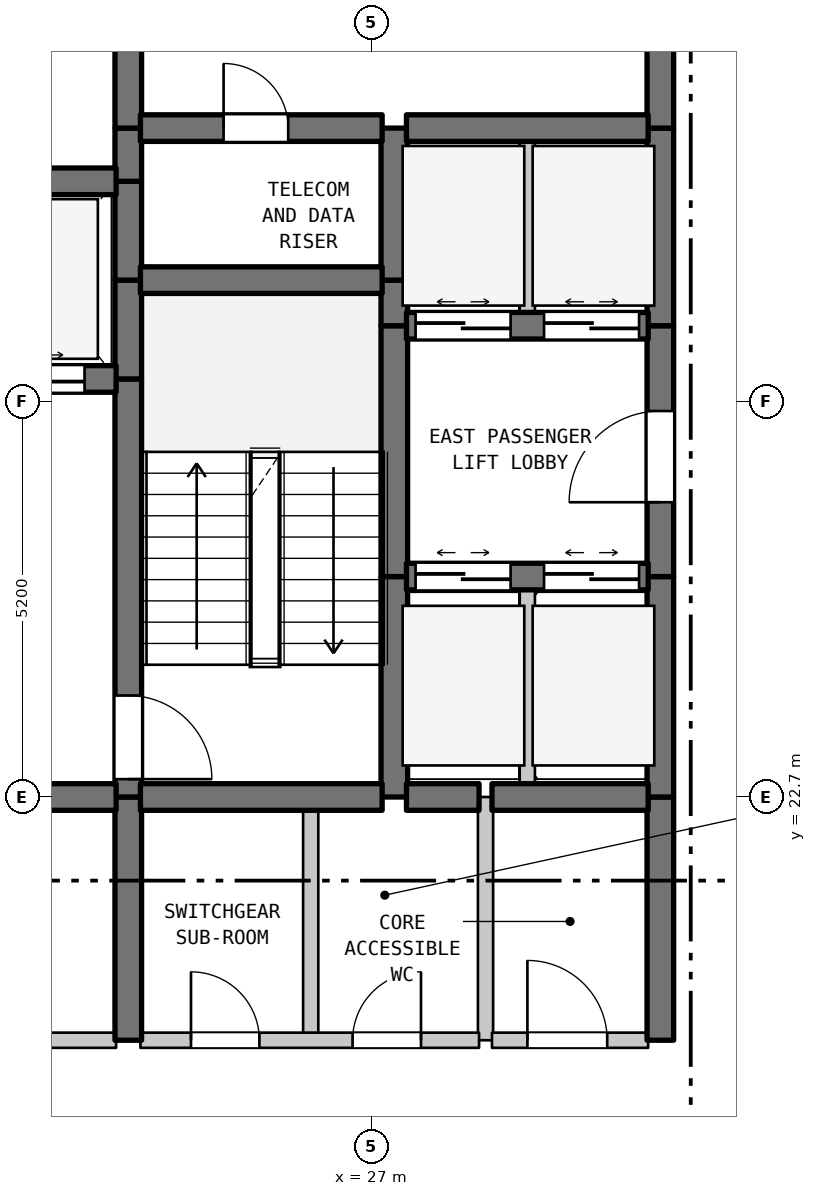
"""IFC4 building model, lengths in metres.
Left out: names, types, materials, properties, quantities, classifications, styles, units other than length and angle.
Written with IfcOpenShell. Run it as: python <this file> out.ifc"""

import sys

from ifc_helpers import new_model, si_unit, direction, frame, frame_2d, origin, place, context, subcontext, project, spatial, rectangle, extrude, element, fill, save


model = new_model("IFC4")
c1 = context("Model", 3, precision=1e-05, world=origin(), true_north=direction((0.0, 1.0)))
c2 = subcontext(c1, "Body", "Model", "MODEL_VIEW")
j1 = project(units=[si_unit("LENGTHUNIT", "METRE"), si_unit("PLANEANGLEUNIT", "RADIAN")], contexts=[c1])
p1 = place(None, origin())
s1 = spatial("IfcSite", under=j1, at=p1, CompositionType="ELEMENT")
p2 = place(p1, origin())
s2 = spatial("IfcBuilding", under=s1, at=p2, CompositionType="ELEMENT")
p3 = place(p2, frame((0.0, 0.0, 192.1)))
s3 = spatial("IfcBuildingStorey", under=s2, at=p3, CompositionType="ELEMENT", Elevation=192.1)
p4 = place(p3, frame((23.8, 19.5, 0.0), z_axis=(0.0, 0.0, 1.0), x_axis=(0.0, 1.0, 0.0)))
e1 = element("IfcWall", 1, at=p4, inside=s3, PredefinedType="SHEAR", context=c2, shape_type="SweptSolid", body=[
    extrude(rectangle(XDim=3.2, YDim=0.35, at=frame_2d((1.6, 0.0))), origin(), (0.0, 0.0, 1.0), 3.39),
])
p5 = place(p3, frame((23.8, 22.7, 0.0), z_axis=(0.0, 0.0, 1.0), x_axis=(0.0, 1.0, 0.0)))
e2 = element("IfcWall", 2, at=p5, inside=s3, PredefinedType="SHEAR", context=c2, shape_type="SweptSolid", body=[
    extrude(rectangle(XDim=5.5, YDim=0.35, at=frame_2d((2.75, 0.0))), origin(), (0.0, 0.0, 1.0), 3.39),
])
p6 = place(p5, frame((0.235, 0.0, 0.0)))
e3 = element("IfcOpeningElement", 3, at=p6, cuts=e2, PredefinedType="OPENING", context=c2, shape_type="SweptSolid", body=[
    extrude(rectangle(XDim=1.1, YDim=2.15, at=frame_2d((0.55, 1.075))), frame((0.0, 0.185, 0.0), z_axis=(0.0, -1.0, 0.0), x_axis=(1.0, 0.0, 0.0)), (0.0, 0.0, 1.0), 0.37),
])
for number, where, z_axis, x_axis in (
    (4, (23.8, 28.2, 0.0), (0.0, 0.0, 1.0), (0.0, 1.0, 0.0)),
    (5, (23.8, 29.5, 0.0), (0.0, 0.0, 1.0), (0.0, 1.0, 0.0)),
):
    element("IfcWall", number, at=place(p3, frame(where, z_axis=z_axis, x_axis=x_axis)), inside=s3, PredefinedType="SHEAR", context=c2, shape_type="SweptSolid", body=[
        extrude(rectangle(XDim=1.3, YDim=0.35, at=frame_2d((0.65, 0.0))), origin(), (0.0, 0.0, 1.0), 3.39),
    ])
p7 = place(p3, frame((23.8, 30.8, 0.0), z_axis=(0.0, 0.0, 1.0), x_axis=(0.0, 1.0, 0.0)))
e6 = element("IfcWall", 6, at=p7, inside=s3, PredefinedType="SHEAR", context=c2, shape_type="SweptSolid", body=[
    extrude(rectangle(XDim=0.7, YDim=0.35, at=frame_2d((0.35, 0.0))), origin(), (0.0, 0.0, 1.0), 3.39),
])
p8 = place(p3, frame((23.8, 31.5, 0.0), z_axis=(0.0, 0.0, 1.0), x_axis=(0.0, 1.0, 0.0)))
e7 = element("IfcWall", 7, at=p8, inside=s3, PredefinedType="SHEAR", context=c2, shape_type="SweptSolid", body=[
    extrude(rectangle(XDim=3.5, YDim=0.35, at=frame_2d((1.75, 0.0))), origin(), (0.0, 0.0, 1.0), 3.39),
])
p9 = place(p8, frame((1.127, 0.0, 0.0)))
e8 = element("IfcOpeningElement", 8, at=p9, cuts=e7, PredefinedType="OPENING", context=c2, shape_type="SweptSolid", body=[
    extrude(rectangle(XDim=1.1, YDim=2.15, at=frame_2d((0.55, 1.075))), frame((0.0, 0.185, 0.0), z_axis=(0.0, -1.0, 0.0), x_axis=(1.0, 0.0, 0.0)), (0.0, 0.0, 1.0), 0.37),
])
p10 = place(p3, frame((26.2, 19.5, 0.0), z_axis=(0.0, 0.0, 1.0), x_axis=(0.0, 1.0, 0.0)))
e9 = element("IfcWall", 9, at=p10, inside=s3, PredefinedType="STANDARD", context=c2, shape_type="SweptSolid", body=[
    extrude(rectangle(XDim=3.2, YDim=0.2, at=frame_2d((1.6, 0.0))), origin(), (0.0, 0.0, 1.0), 3.39),
])
p11 = place(p3, frame((27.3, 22.7, 0.0), z_axis=(0.0, 0.0, 1.0), x_axis=(0.0, 1.0, 0.0)))
e10 = element("IfcWall", 10, at=p11, inside=s3, PredefinedType="SHEAR", context=c2, shape_type="SweptSolid", body=[
    extrude(rectangle(XDim=2.9, YDim=0.35, at=frame_2d((1.45, 0.0))), origin(), (0.0, 0.0, 1.0), 3.39),
])
p12 = place(p3, frame((27.3, 25.6, 0.0), z_axis=(0.0, 0.0, 1.0), x_axis=(0.0, 1.0, 0.0)))
e11 = element("IfcWall", 11, at=p12, inside=s3, PredefinedType="SHEAR", context=c2, shape_type="SweptSolid", body=[
    extrude(rectangle(XDim=3.3, YDim=0.35, at=frame_2d((1.65, 0.0))), origin(), (0.0, 0.0, 1.0), 3.39),
])
p13 = place(p3, frame((27.3, 28.9, 0.0), z_axis=(0.0, 0.0, 1.0), x_axis=(0.0, 1.0, 0.0)))
e12 = element("IfcWall", 12, at=p13, inside=s3, PredefinedType="SHEAR", context=c2, shape_type="SweptSolid", body=[
    extrude(rectangle(XDim=0.6, YDim=0.35, at=frame_2d((0.3, 0.0))), origin(), (0.0, 0.0, 1.0), 3.39),
])
p14 = place(p3, frame((27.3, 29.5, 0.0), z_axis=(0.0, 0.0, 1.0), x_axis=(0.0, 1.0, 0.0)))
e13 = element("IfcWall", 13, at=p14, inside=s3, PredefinedType="SHEAR", context=c2, shape_type="SweptSolid", body=[
    extrude(rectangle(XDim=2.0, YDim=0.35, at=frame_2d((1.0, 0.0))), origin(), (0.0, 0.0, 1.0), 3.39),
])
p15 = place(p3, frame((28.5, 19.5, 0.0), z_axis=(0.0, 0.0, 1.0), x_axis=(0.0, 1.0, 0.0)))
e14 = element("IfcWall", 14, at=p15, inside=s3, PredefinedType="STANDARD", context=c2, shape_type="SweptSolid", body=[
    extrude(rectangle(XDim=3.2, YDim=0.2, at=frame_2d((1.6, 0.0))), origin(), (0.0, 0.0, 1.0), 3.39),
])
p16 = place(p3, frame((29.05, 22.7, 0.0), z_axis=(0.0, 0.0, 1.0), x_axis=(0.0, 1.0, 0.0)))
e15 = element("IfcWall", 15, at=p16, inside=s3, PredefinedType="STANDARD", context=c2, shape_type="SweptSolid", body=[
    extrude(rectangle(XDim=2.9, YDim=0.2, at=frame_2d((1.45, 0.0))), origin(), (0.0, 0.0, 1.0), 3.39),
])
p17 = place(p3, frame((29.05, 28.9, 0.0), z_axis=(0.0, 0.0, 1.0), x_axis=(0.0, 1.0, 0.0)))
e16 = element("IfcWall", 16, at=p17, inside=s3, PredefinedType="STANDARD", context=c2, shape_type="SweptSolid", body=[
    extrude(rectangle(XDim=2.6, YDim=0.2, at=frame_2d((1.3, 0.0))), origin(), (0.0, 0.0, 1.0), 3.39),
])
p18 = place(p3, frame((30.8, 19.5, 0.0), z_axis=(0.0, 0.0, 1.0), x_axis=(0.0, 1.0, 0.0)))
e17 = element("IfcWall", 17, at=p18, inside=s3, PredefinedType="SHEAR", context=c2, shape_type="SweptSolid", body=[
    extrude(rectangle(XDim=3.2, YDim=0.35, at=frame_2d((1.6, 0.0))), origin(), (0.0, 0.0, 1.0), 3.39),
])
p19 = place(p3, frame((30.8, 22.7, 0.0), z_axis=(0.0, 0.0, 1.0), x_axis=(0.0, 1.0, 0.0)))
e18 = element("IfcWall", 18, at=p19, inside=s3, PredefinedType="SHEAR", context=c2, shape_type="SweptSolid", body=[
    extrude(rectangle(XDim=2.9, YDim=0.35, at=frame_2d((1.45, 0.0))), origin(), (0.0, 0.0, 1.0), 3.39),
])
p20 = place(p3, frame((30.8, 25.6, 0.0), z_axis=(0.0, 0.0, 1.0), x_axis=(0.0, 1.0, 0.0)))
e19 = element("IfcWall", 19, at=p20, inside=s3, PredefinedType="SHEAR", context=c2, shape_type="SweptSolid", body=[
    extrude(rectangle(XDim=3.3, YDim=0.35, at=frame_2d((1.65, 0.0))), origin(), (0.0, 0.0, 1.0), 3.39),
])
p21 = place(p20, frame((0.978, 0.0, 0.0)))
e20 = element("IfcOpeningElement", 20, at=p21, cuts=e19, PredefinedType="OPENING", context=c2, shape_type="SweptSolid", body=[
    extrude(rectangle(XDim=1.2, YDim=2.2, at=frame_2d((0.6, 1.1))), frame((0.0, 0.185, 0.0), z_axis=(0.0, -1.0, 0.0), x_axis=(1.0, 0.0, 0.0)), (0.0, 0.0, 1.0), 0.37),
])
p22 = place(p3, frame((30.8, 28.9, 0.0), z_axis=(0.0, 0.0, 1.0), x_axis=(0.0, 1.0, 0.0)))
e21 = element("IfcWall", 21, at=p22, inside=s3, PredefinedType="SHEAR", context=c2, shape_type="SweptSolid", body=[
    extrude(rectangle(XDim=2.6, YDim=0.35, at=frame_2d((1.3, 0.0))), origin(), (0.0, 0.0, 1.0), 3.39),
])
p23 = place(p3, frame((30.8, 31.5, 0.0), z_axis=(0.0, 0.0, 1.0), x_axis=(0.0, 1.0, 0.0)))
e22 = element("IfcWall", 22, at=p23, inside=s3, PredefinedType="SHEAR", context=c2, shape_type="SweptSolid", body=[
    extrude(rectangle(XDim=3.5, YDim=0.35, at=frame_2d((1.75, 0.0))), origin(), (0.0, 0.0, 1.0), 3.39),
])
p24 = place(p23, frame((1.15, 0.0, 0.0)))
e23 = element("IfcOpeningElement", 23, at=p24, cuts=e22, PredefinedType="OPENING", context=c2, shape_type="SweptSolid", body=[
    extrude(rectangle(XDim=1.2, YDim=2.2, at=frame_2d((0.6, 1.1))), frame((0.0, 0.185, 0.0), z_axis=(0.0, -1.0, 0.0), x_axis=(1.0, 0.0, 0.0)), (0.0, 0.0, 1.0), 0.37),
])
p25 = place(p3, frame((19.16, 19.5, 0.0), z_axis=(0.0, 0.0, 1.0), x_axis=(1.0, 0.0, 0.0)))
e24 = element("IfcWall", 24, at=p25, inside=s3, PredefinedType="STANDARD", context=c2, shape_type="SweptSolid", body=[
    extrude(rectangle(XDim=4.48, YDim=0.2, at=frame_2d((2.24, 0.0))), origin(), (0.0, 0.0, 1.0), 3.39),
])
p26 = place(p25, frame((1.64, 0.0, 0.0)))
e25 = element("IfcOpeningElement", 25, at=p26, cuts=e24, PredefinedType="OPENING", context=c2, shape_type="SweptSolid", body=[
    extrude(rectangle(XDim=1.2, YDim=2.2, at=frame_2d((0.6, 1.1))), frame((0.0, 0.11, 0.0), z_axis=(0.0, -1.0, 0.0), x_axis=(1.0, 0.0, 0.0)), (0.0, 0.0, 1.0), 0.22),
])
p27 = place(p3, frame((23.96, 19.5, 0.0), z_axis=(0.0, 0.0, 1.0), x_axis=(1.0, 0.0, 0.0)))
e26 = element("IfcWall", 26, at=p27, inside=s3, PredefinedType="STANDARD", context=c2, shape_type="SweptSolid", body=[
    extrude(rectangle(XDim=4.455, YDim=0.2, at=frame_2d((2.228, 0.0))), origin(), (0.0, 0.0, 1.0), 3.39),
])
p28 = place(p27, frame((0.665, 0.0, 0.0)))
e27 = element("IfcOpeningElement", 27, at=p28, cuts=e26, PredefinedType="OPENING", context=c2, shape_type="SweptSolid", body=[
    extrude(rectangle(XDim=0.9, YDim=2.15, at=frame_2d((0.45, 1.075))), frame((0.0, 0.11, 0.0), z_axis=(0.0, -1.0, 0.0), x_axis=(1.0, 0.0, 0.0)), (0.0, 0.0, 1.0), 0.22),
])
p29 = place(p27, frame((2.791, 0.0, 0.0)))
e28 = element("IfcOpeningElement", 28, at=p29, cuts=e26, PredefinedType="OPENING", context=c2, shape_type="SweptSolid", body=[
    extrude(rectangle(XDim=0.9, YDim=2.15, at=frame_2d((0.45, 1.075))), frame((0.0, 0.11, 0.0), z_axis=(0.0, -1.0, 0.0), x_axis=(1.0, 0.0, 0.0)), (0.0, 0.0, 1.0), 0.22),
])
p30 = place(p3, frame((28.585, 19.5, 0.0), z_axis=(0.0, 0.0, 1.0), x_axis=(1.0, 0.0, 0.0)))
e29 = element("IfcWall", 29, at=p30, inside=s3, PredefinedType="STANDARD", context=c2, shape_type="SweptSolid", body=[
    extrude(rectangle(XDim=2.055, YDim=0.2, at=frame_2d((1.027, 0.0))), origin(), (0.0, 0.0, 1.0), 3.39),
])
p31 = place(p30, frame((0.466, 0.0, 0.0)))
e30 = element("IfcOpeningElement", 30, at=p31, cuts=e29, PredefinedType="OPENING", context=c2, shape_type="SweptSolid", body=[
    extrude(rectangle(XDim=1.05, YDim=2.15, at=frame_2d((0.525, 1.075))), frame((0.0, 0.11, 0.0), z_axis=(0.0, -1.0, 0.0), x_axis=(1.0, 0.0, 0.0)), (0.0, 0.0, 1.0), 0.22),
])
p32 = place(p3, frame((19.16, 22.7, 0.0), z_axis=(0.0, 0.0, 1.0), x_axis=(1.0, 0.0, 0.0)))
e31 = element("IfcWall", 31, at=p32, inside=s3, PredefinedType="SHEAR", context=c2, shape_type="SweptSolid", body=[
    extrude(rectangle(XDim=4.48, YDim=0.35, at=frame_2d((2.24, 0.0))), origin(), (0.0, 0.0, 1.0), 3.39),
])
p33 = place(p32, frame((1.64, 0.0, 0.0)))
e32 = element("IfcOpeningElement", 32, at=p33, cuts=e31, PredefinedType="OPENING", context=c2, shape_type="SweptSolid", body=[
    extrude(rectangle(XDim=1.2, YDim=2.2, at=frame_2d((0.6, 1.1))), frame((0.0, 0.185, 0.0), z_axis=(0.0, -1.0, 0.0), x_axis=(1.0, 0.0, 0.0)), (0.0, 0.0, 1.0), 0.37),
])
p34 = place(p3, frame((23.96, 22.7, 0.0), z_axis=(0.0, 0.0, 1.0), x_axis=(1.0, 0.0, 0.0)))
e33 = element("IfcWall", 33, at=p34, inside=s3, PredefinedType="SHEAR", context=c2, shape_type="SweptSolid", body=[
    extrude(rectangle(XDim=3.18, YDim=0.35, at=frame_2d((1.59, 0.0))), origin(), (0.0, 0.0, 1.0), 3.39),
])
p35 = place(p3, frame((27.46, 22.7, 0.0), z_axis=(0.0, 0.0, 1.0), x_axis=(1.0, 0.0, 0.0)))
e34 = element("IfcWall", 34, at=p35, inside=s3, PredefinedType="SHEAR", context=c2, shape_type="SweptSolid", body=[
    extrude(rectangle(XDim=0.955, YDim=0.35, at=frame_2d((0.478, 0.0))), origin(), (0.0, 0.0, 1.0), 3.39),
])
p36 = place(p3, frame((28.585, 22.7, 0.0), z_axis=(0.0, 0.0, 1.0), x_axis=(1.0, 0.0, 0.0)))
e35 = element("IfcWall", 35, at=p36, inside=s3, PredefinedType="SHEAR", context=c2, shape_type="SweptSolid", body=[
    extrude(rectangle(XDim=2.055, YDim=0.35, at=frame_2d((1.027, 0.0))), origin(), (0.0, 0.0, 1.0), 3.39),
])
p37 = place(p3, frame((27.46, 25.6, 0.0), z_axis=(0.0, 0.0, 1.0), x_axis=(1.0, 0.0, 0.0)))
e36 = element("IfcWall", 36, at=p37, inside=s3, PredefinedType="SHEAR", context=c2, shape_type="SweptSolid", body=[
    extrude(rectangle(XDim=3.18, YDim=0.35, at=frame_2d((1.59, 0.0))), origin(), (0.0, 0.0, 1.0), 3.39),
])
p38 = place(p37, frame((0.12, 0.0, 0.0)))
e37 = element("IfcOpeningElement", 37, at=p38, cuts=e36, PredefinedType="OPENING", context=c2, shape_type="SweptSolid", body=[
    extrude(rectangle(XDim=1.25, YDim=2.2, at=frame_2d((0.625, 1.1))), frame((0.0, 0.185, 0.0), z_axis=(0.0, -1.0, 0.0), x_axis=(1.0, 0.0, 0.0)), (0.0, 0.0, 1.0), 0.37),
])
p39 = place(p37, frame((1.81, 0.0, 0.0)))
e38 = element("IfcOpeningElement", 38, at=p39, cuts=e36, PredefinedType="OPENING", context=c2, shape_type="SweptSolid", body=[
    extrude(rectangle(XDim=1.25, YDim=2.2, at=frame_2d((0.625, 1.1))), frame((0.0, 0.185, 0.0), z_axis=(0.0, -1.0, 0.0), x_axis=(1.0, 0.0, 0.0)), (0.0, 0.0, 1.0), 0.37),
])
p40 = place(p3, frame((19.16, 28.2, 0.0), z_axis=(0.0, 0.0, 1.0), x_axis=(1.0, 0.0, 0.0)))
e39 = element("IfcWall", 39, at=p40, inside=s3, PredefinedType="SHEAR", context=c2, shape_type="SweptSolid", body=[
    extrude(rectangle(XDim=4.48, YDim=0.35, at=frame_2d((2.24, 0.0))), origin(), (0.0, 0.0, 1.0), 3.39),
])
p41 = place(p40, frame((0.415, 0.0, 0.0)))
e40 = element("IfcOpeningElement", 40, at=p41, cuts=e39, PredefinedType="OPENING", context=c2, shape_type="SweptSolid", body=[
    extrude(rectangle(XDim=1.25, YDim=2.2, at=frame_2d((0.625, 1.1))), frame((0.0, 0.185, 0.0), z_axis=(0.0, -1.0, 0.0), x_axis=(1.0, 0.0, 0.0)), (0.0, 0.0, 1.0), 0.37),
])
p42 = place(p40, frame((2.815, 0.0, 0.0)))
e41 = element("IfcOpeningElement", 41, at=p42, cuts=e39, PredefinedType="OPENING", context=c2, shape_type="SweptSolid", body=[
    extrude(rectangle(XDim=1.25, YDim=2.2, at=frame_2d((0.625, 1.1))), frame((0.0, 0.185, 0.0), z_axis=(0.0, -1.0, 0.0), x_axis=(1.0, 0.0, 0.0)), (0.0, 0.0, 1.0), 0.37),
])
p43 = place(p3, frame((27.46, 28.9, 0.0), z_axis=(0.0, 0.0, 1.0), x_axis=(1.0, 0.0, 0.0)))
e42 = element("IfcWall", 42, at=p43, inside=s3, PredefinedType="SHEAR", context=c2, shape_type="SweptSolid", body=[
    extrude(rectangle(XDim=3.18, YDim=0.35, at=frame_2d((1.59, 0.0))), origin(), (0.0, 0.0, 1.0), 3.39),
])
p44 = place(p43, frame((0.12, 0.0, 0.0)))
e43 = element("IfcOpeningElement", 43, at=p44, cuts=e42, PredefinedType="OPENING", context=c2, shape_type="SweptSolid", body=[
    extrude(rectangle(XDim=1.25, YDim=2.2, at=frame_2d((0.625, 1.1))), frame((0.0, 0.185, 0.0), z_axis=(0.0, -1.0, 0.0), x_axis=(1.0, 0.0, 0.0)), (0.0, 0.0, 1.0), 0.37),
])
p45 = place(p43, frame((1.81, 0.0, 0.0)))
e44 = element("IfcOpeningElement", 44, at=p45, cuts=e42, PredefinedType="OPENING", context=c2, shape_type="SweptSolid", body=[
    extrude(rectangle(XDim=1.25, YDim=2.2, at=frame_2d((0.625, 1.1))), frame((0.0, 0.185, 0.0), z_axis=(0.0, -1.0, 0.0), x_axis=(1.0, 0.0, 0.0)), (0.0, 0.0, 1.0), 0.37),
])
p46 = place(p3, frame((23.96, 29.5, 0.0), z_axis=(0.0, 0.0, 1.0), x_axis=(1.0, 0.0, 0.0)))
e45 = element("IfcWall", 45, at=p46, inside=s3, PredefinedType="SHEAR", context=c2, shape_type="SweptSolid", body=[
    extrude(rectangle(XDim=3.18, YDim=0.35, at=frame_2d((1.59, 0.0))), origin(), (0.0, 0.0, 1.0), 3.39),
])
p47 = place(p3, frame((19.16, 30.8, 0.0), z_axis=(0.0, 0.0, 1.0), x_axis=(1.0, 0.0, 0.0)))
e46 = element("IfcWall", 46, at=p47, inside=s3, PredefinedType="SHEAR", context=c2, shape_type="SweptSolid", body=[
    extrude(rectangle(XDim=4.48, YDim=0.35, at=frame_2d((2.24, 0.0))), origin(), (0.0, 0.0, 1.0), 3.39),
])
p48 = place(p3, frame((23.96, 31.5, 0.0), z_axis=(0.0, 0.0, 1.0), x_axis=(1.0, 0.0, 0.0)))
e47 = element("IfcWall", 47, at=p48, inside=s3, PredefinedType="SHEAR", context=c2, shape_type="SweptSolid", body=[
    extrude(rectangle(XDim=3.18, YDim=0.35, at=frame_2d((1.59, 0.0))), origin(), (0.0, 0.0, 1.0), 3.39),
])
p49 = place(p48, frame((1.094, 0.0, 0.0)))
e48 = element("IfcOpeningElement", 48, at=p49, cuts=e47, PredefinedType="OPENING", context=c2, shape_type="SweptSolid", body=[
    extrude(rectangle(XDim=0.85, YDim=2.1, at=frame_2d((0.425, 1.05))), frame((0.0, 0.185, 0.0), z_axis=(0.0, -1.0, 0.0), x_axis=(1.0, 0.0, 0.0)), (0.0, 0.0, 1.0), 0.37),
])
p50 = place(p3, frame((27.46, 31.5, 0.0), z_axis=(0.0, 0.0, 1.0), x_axis=(1.0, 0.0, 0.0)))
e49 = element("IfcWall", 49, at=p50, inside=s3, PredefinedType="SHEAR", context=c2, shape_type="SweptSolid", body=[
    extrude(rectangle(XDim=3.18, YDim=0.35, at=frame_2d((1.59, 0.0))), origin(), (0.0, 0.0, 1.0), 3.39),
])
p51 = place(p6, frame((1.1, 0.0, 0.0), z_axis=(0.0, 0.0, 1.0), x_axis=(-1.0, 0.0, 0.0)))
e50 = element("IfcDoor", 50, at=p51, inside=s3, OperationType="SINGLE_SWING_LEFT", PredefinedType="DOOR", context=c2, shape_type="SweptSolid", body=[
    extrude(rectangle(XDim=1.1, YDim=2.15, at=frame_2d((0.55, 1.075))), frame((0.0, 0.025, 0.0), z_axis=(0.0, -1.0, 0.0), x_axis=(1.0, 0.0, 0.0)), (0.0, 0.0, 1.0), 0.05),
])
fill(e3, e50)
p52 = place(p21, origin())
e51 = element("IfcDoor", 51, at=p52, inside=s3, OperationType="SINGLE_SWING_LEFT", PredefinedType="DOOR", context=c2, shape_type="SweptSolid", body=[
    extrude(rectangle(XDim=1.2, YDim=2.2, at=frame_2d((0.6, 1.1))), frame((0.0, 0.025, 0.0), z_axis=(0.0, -1.0, 0.0), x_axis=(1.0, 0.0, 0.0)), (0.0, 0.0, 1.0), 0.05),
])
fill(e20, e51)
p53 = place(p28, origin())
e52 = element("IfcDoor", 52, at=p53, inside=s3, OperationType="SINGLE_SWING_LEFT", PredefinedType="DOOR", context=c2, shape_type="SweptSolid", body=[
    extrude(rectangle(XDim=0.9, YDim=2.15, at=frame_2d((0.45, 1.075))), frame((0.0, 0.025, 0.0), z_axis=(0.0, -1.0, 0.0), x_axis=(1.0, 0.0, 0.0)), (0.0, 0.0, 1.0), 0.05),
])
fill(e27, e52)
p54 = place(p29, origin())
e53 = element("IfcDoor", 53, at=p54, inside=s3, OperationType="SINGLE_SWING_RIGHT", PredefinedType="DOOR", context=c2, shape_type="SweptSolid", body=[
    extrude(rectangle(XDim=0.9, YDim=2.15, at=frame_2d((0.45, 1.075))), frame((0.0, 0.025, 0.0), z_axis=(0.0, -1.0, 0.0), x_axis=(1.0, 0.0, 0.0)), (0.0, 0.0, 1.0), 0.05),
])
fill(e28, e53)
p55 = place(p31, origin())
e54 = element("IfcDoor", 54, at=p55, inside=s3, OperationType="SINGLE_SWING_LEFT", PredefinedType="DOOR", context=c2, shape_type="SweptSolid", body=[
    extrude(rectangle(XDim=1.05, YDim=2.15, at=frame_2d((0.525, 1.075))), frame((0.0, 0.025, 0.0), z_axis=(0.0, -1.0, 0.0), x_axis=(1.0, 0.0, 0.0)), (0.0, 0.0, 1.0), 0.05),
])
fill(e30, e54)
p56 = place(p38, origin())
e55 = element("IfcDoor", 55, at=p56, inside=s3, OperationType="DOUBLE_DOOR_SLIDING", PredefinedType="DOOR", context=c2, shape_type="SweptSolid", body=[
    extrude(rectangle(XDim=1.25, YDim=2.2, at=frame_2d((0.625, 1.1))), frame((0.0, 0.025, 0.0), z_axis=(0.0, -1.0, 0.0), x_axis=(1.0, 0.0, 0.0)), (0.0, 0.0, 1.0), 0.05),
])
fill(e37, e55)
p57 = place(p39, origin())
e56 = element("IfcDoor", 56, at=p57, inside=s3, OperationType="DOUBLE_DOOR_SLIDING", PredefinedType="DOOR", context=c2, shape_type="SweptSolid", body=[
    extrude(rectangle(XDim=1.25, YDim=2.2, at=frame_2d((0.625, 1.1))), frame((0.0, 0.025, 0.0), z_axis=(0.0, -1.0, 0.0), x_axis=(1.0, 0.0, 0.0)), (0.0, 0.0, 1.0), 0.05),
])
fill(e38, e56)
p58 = place(p42, origin())
e57 = element("IfcDoor", 57, at=p58, inside=s3, OperationType="DOUBLE_DOOR_SLIDING", PredefinedType="DOOR", context=c2, shape_type="SweptSolid", body=[
    extrude(rectangle(XDim=1.25, YDim=2.2, at=frame_2d((0.625, 1.1))), frame((0.0, 0.025, 0.0), z_axis=(0.0, -1.0, 0.0), x_axis=(1.0, 0.0, 0.0)), (0.0, 0.0, 1.0), 0.05),
])
fill(e41, e57)
p59 = place(p44, origin())
e58 = element("IfcDoor", 58, at=p59, inside=s3, OperationType="DOUBLE_DOOR_SLIDING", PredefinedType="DOOR", context=c2, shape_type="SweptSolid", body=[
    extrude(rectangle(XDim=1.25, YDim=2.2, at=frame_2d((0.625, 1.1))), frame((0.0, 0.025, 0.0), z_axis=(0.0, -1.0, 0.0), x_axis=(1.0, 0.0, 0.0)), (0.0, 0.0, 1.0), 0.05),
])
fill(e43, e58)
p60 = place(p45, origin())
e59 = element("IfcDoor", 59, at=p60, inside=s3, OperationType="DOUBLE_DOOR_SLIDING", PredefinedType="DOOR", context=c2, shape_type="SweptSolid", body=[
    extrude(rectangle(XDim=1.25, YDim=2.2, at=frame_2d((0.625, 1.1))), frame((0.0, 0.025, 0.0), z_axis=(0.0, -1.0, 0.0), x_axis=(1.0, 0.0, 0.0)), (0.0, 0.0, 1.0), 0.05),
])
fill(e44, e59)
p61 = place(p49, origin())
e60 = element("IfcDoor", 60, at=p61, inside=s3, OperationType="SINGLE_SWING_LEFT", PredefinedType="DOOR", context=c2, shape_type="SweptSolid", body=[
    extrude(rectangle(XDim=0.85, YDim=2.1, at=frame_2d((0.425, 1.05))), frame((0.0, 0.025, 0.0), z_axis=(0.0, -1.0, 0.0), x_axis=(1.0, 0.0, 0.0)), (0.0, 0.0, 1.0), 0.05),
])
fill(e48, e60)
save(model, sys.argv[1])
